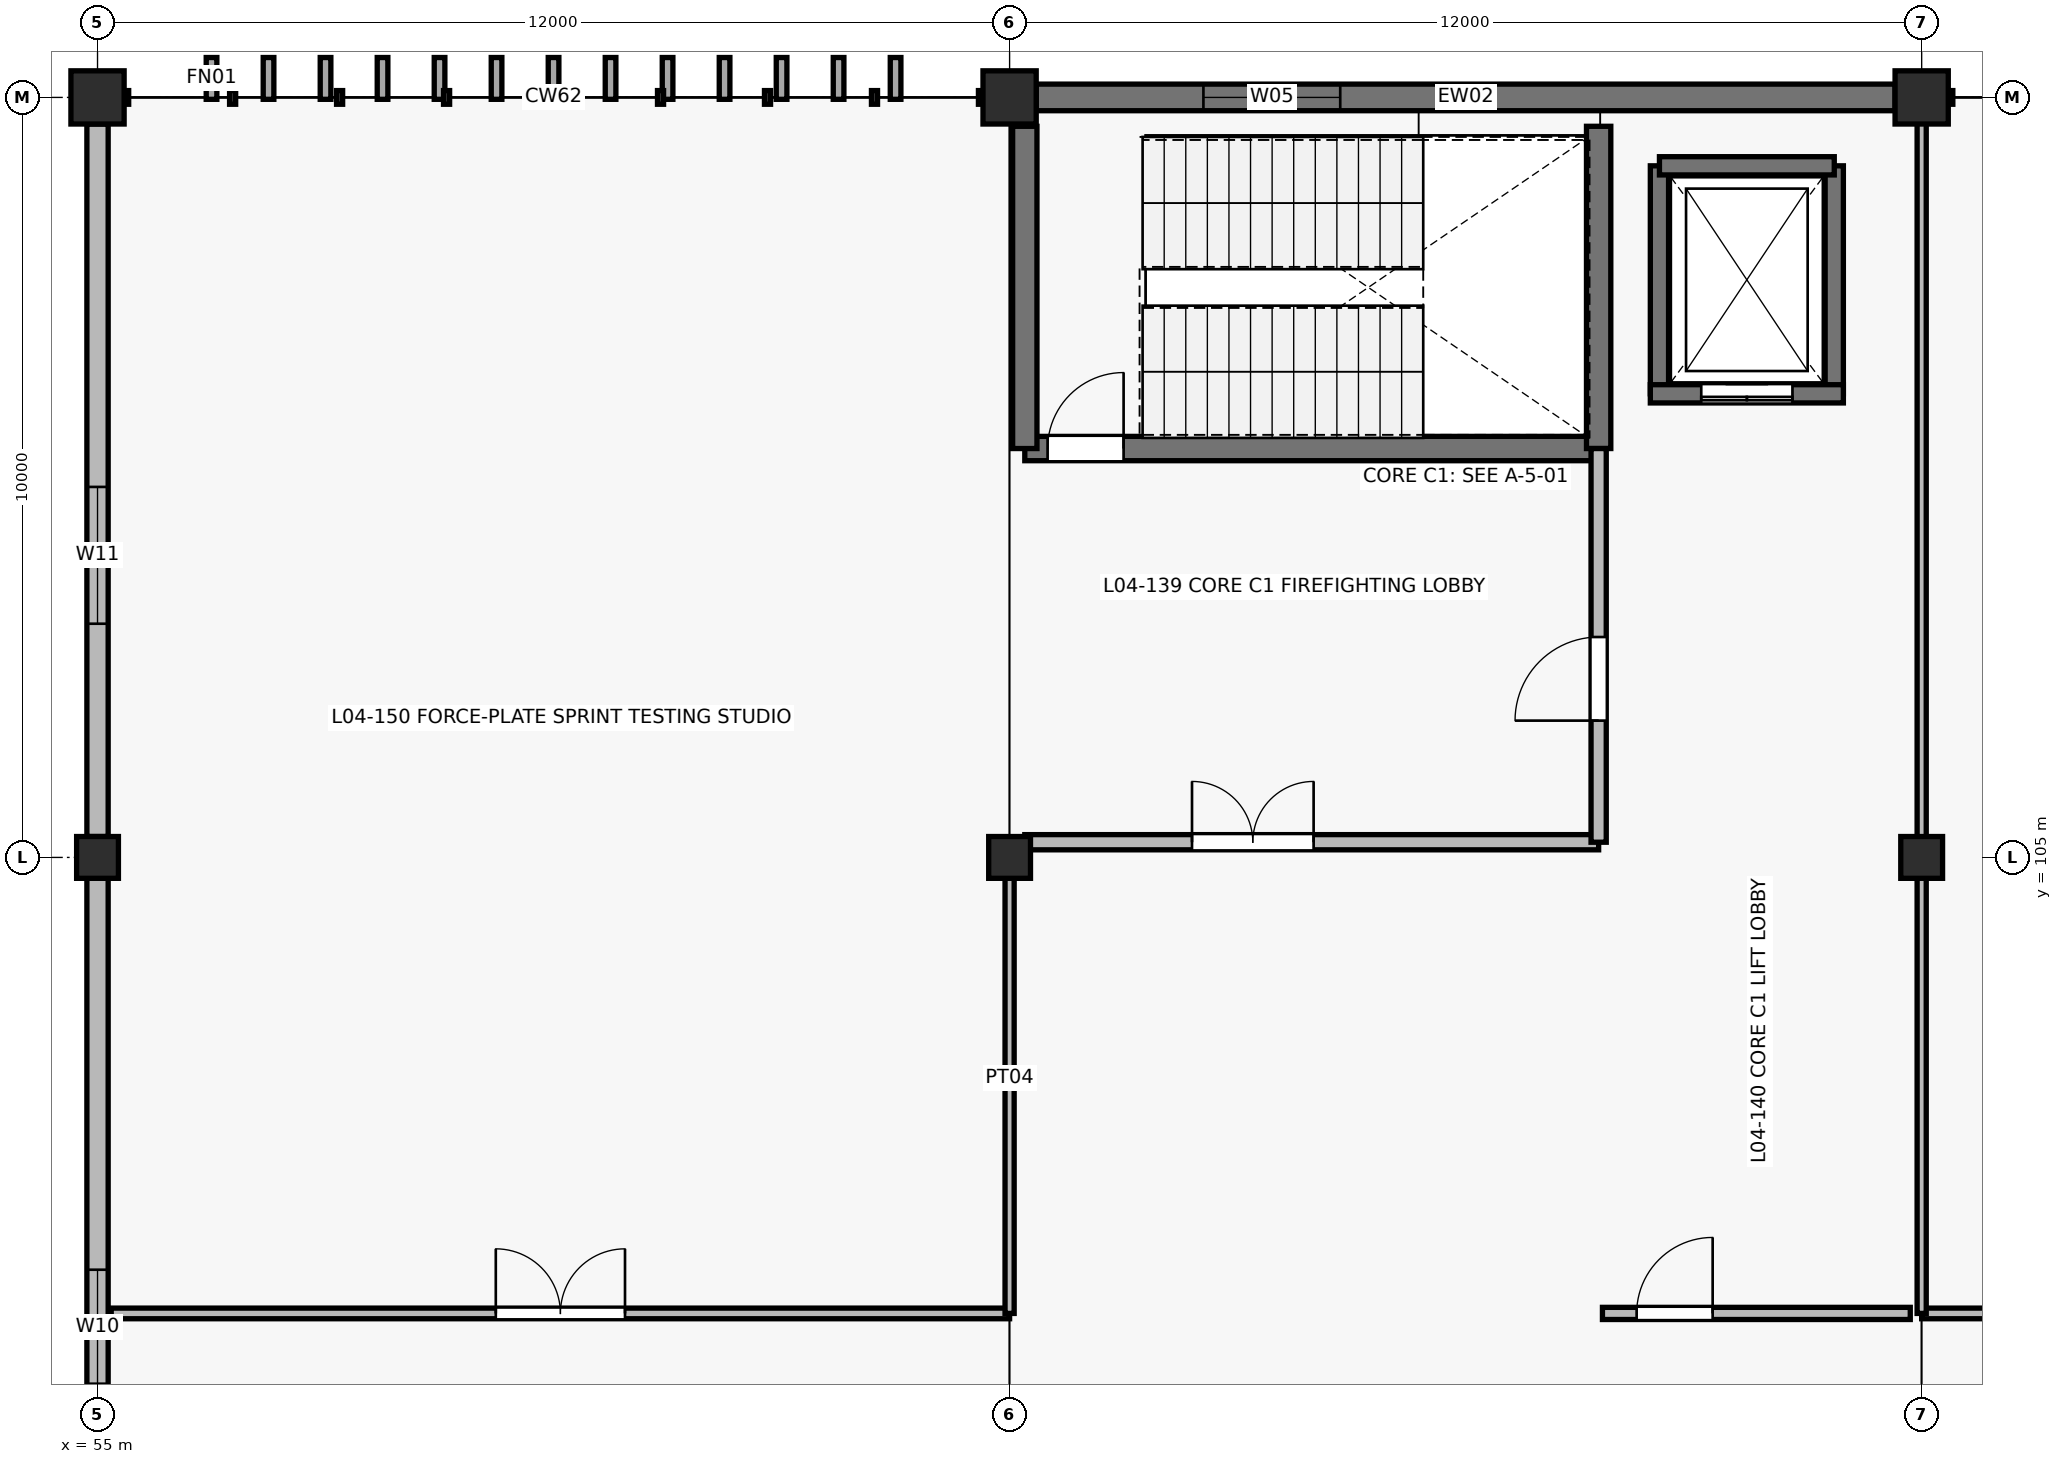
"""IFC4 building model, lengths in metres.
Left out: names, types, materials, properties, quantities, classifications, styles, units other than length and angle.
Written with IfcOpenShell. Run it as: python <this file> out.ifc"""

import sys

from ifc_helpers import new_model, si_unit, direction, frame, frame_2d, origin, origin_2d, place, context, subcontext, project, spatial, rectangle, circle, extrude, element, fill, save


model = new_model("IFC4")
c1 = context("Model", 3, precision=1e-05, world=origin(), true_north=direction((0.0, 1.0)))
c2 = subcontext(c1, "Body", "Model", "MODEL_VIEW")
j1 = project(units=[si_unit("LENGTHUNIT", "METRE"), si_unit("PLANEANGLEUNIT", "RADIAN")], contexts=[c1])
p1 = place(None, origin())
s1 = spatial("IfcSite", under=j1, at=p1, CompositionType="ELEMENT")
p2 = place(p1, origin())
s2 = spatial("IfcBuilding", under=s1, at=p2, CompositionType="ELEMENT")
p3 = place(p2, frame((0.0, 0.0, 17.4)))
s3 = spatial("IfcBuildingStorey", under=s2, at=p3, CompositionType="ELEMENT", Elevation=17.4)
p4 = place(p3, frame((55.0, 105.0, 0.0), z_axis=(0.0, 0.0, 1.0), x_axis=(1.0, 0.0, 0.0)))
e1 = element("IfcColumn", 1, at=p4, inside=s3, PredefinedType="COLUMN", context=c2, shape_type="SweptSolid", body=[
    extrude(rectangle(XDim=0.55, YDim=0.55, at=origin_2d()), origin(), (0.0, 0.0, 1.0), 4.2),
])
p5 = place(p3, frame((55.0, 115.0, 0.0), z_axis=(0.0, 0.0, 1.0), x_axis=(1.0, 0.0, 0.0)))
e2 = element("IfcColumn", 2, at=p5, inside=s3, PredefinedType="COLUMN", context=c2, shape_type="SweptSolid", body=[
    extrude(circle(Radius=0.35, at=origin_2d()), origin(), (0.0, 0.0, 1.0), 4.2),
])
p6 = place(p3, frame((67.0, 105.0, 0.0), z_axis=(0.0, 0.0, 1.0), x_axis=(1.0, 0.0, 0.0)))
e3 = element("IfcColumn", 3, at=p6, inside=s3, PredefinedType="COLUMN", context=c2, shape_type="SweptSolid", body=[
    extrude(rectangle(XDim=0.55, YDim=0.55, at=origin_2d()), origin(), (0.0, 0.0, 1.0), 4.2),
])
p7 = place(p3, frame((67.0, 115.0, 0.0), z_axis=(0.0, 0.0, 1.0), x_axis=(1.0, 0.0, 0.0)))
e4 = element("IfcColumn", 4, at=p7, inside=s3, PredefinedType="COLUMN", context=c2, shape_type="SweptSolid", body=[
    extrude(circle(Radius=0.35, at=origin_2d()), origin(), (0.0, 0.0, 1.0), 4.2),
])
p8 = place(p3, frame((79.0, 105.0, 0.0), z_axis=(0.0, 0.0, 1.0), x_axis=(1.0, 0.0, 0.0)))
e5 = element("IfcColumn", 5, at=p8, inside=s3, PredefinedType="COLUMN", context=c2, shape_type="SweptSolid", body=[
    extrude(rectangle(XDim=0.55, YDim=0.55, at=origin_2d()), origin(), (0.0, 0.0, 1.0), 4.2),
])
p9 = place(p3, frame((79.0, 115.0, 0.0), z_axis=(0.0, 0.0, 1.0), x_axis=(1.0, 0.0, 0.0)))
e6 = element("IfcColumn", 6, at=p9, inside=s3, PredefinedType="COLUMN", context=c2, shape_type="SweptSolid", body=[
    extrude(circle(Radius=0.35, at=origin_2d()), origin(), (0.0, 0.0, 1.0), 4.2),
])
p10 = place(p3, frame((67.35, 115.0, 0.0), z_axis=(0.0, 0.0, 1.0), x_axis=(1.0, 0.0, 0.0)))
e7 = element("IfcWall", 7, at=p10, inside=s3, PredefinedType="SOLIDWALL", context=c2, shape_type="SweptSolid", body=[
    extrude(rectangle(XDim=11.3, YDim=0.35, at=frame_2d((5.65, 0.0))), origin(), (0.0, 0.0, 1.0), 4.2),
])
p11 = place(p10, frame((2.2, 0.0, 1.0)))
e8 = element("IfcOpeningElement", 8, at=p11, cuts=e7, PredefinedType="OPENING", context=c2, shape_type="SweptSolid", body=[
    extrude(rectangle(XDim=1.8, YDim=1.5, at=frame_2d((0.9, 0.75))), frame((0.0, 0.185, 0.0), z_axis=(0.0, -1.0, 0.0), x_axis=(1.0, 0.0, 0.0)), (0.0, 0.0, 1.0), 0.37),
])
p12 = place(p3, frame((55.0, 95.275, 0.0), z_axis=(0.0, 0.0, 1.0), x_axis=(0.0, 1.0, 0.0)))
e9 = element("IfcWall", 9, at=p12, inside=s3, PredefinedType="SOLIDWALL", context=c2, shape_type="SweptSolid", body=[
    extrude(rectangle(XDim=9.45, YDim=0.28, at=frame_2d((4.725, 0.0))), origin(), (0.0, 0.0, 1.0), 2.975),
])
p13 = place(p12, frame((2.8, 0.0, 0.9)))
e10 = element("IfcOpeningElement", 10, at=p13, cuts=e9, PredefinedType="OPENING", context=c2, shape_type="SweptSolid", body=[
    extrude(rectangle(XDim=1.5, YDim=1.8, at=frame_2d((0.75, 0.9))), frame((0.0, 0.15, 0.0), z_axis=(0.0, -1.0, 0.0), x_axis=(1.0, 0.0, 0.0)), (0.0, 0.0, 1.0), 0.3),
])
p14 = place(p3, frame((55.0, 105.275, 0.0), z_axis=(0.0, 0.0, 1.0), x_axis=(0.0, 1.0, 0.0)))
e11 = element("IfcWall", 11, at=p14, inside=s3, PredefinedType="SOLIDWALL", context=c2, shape_type="SweptSolid", body=[
    extrude(rectangle(XDim=9.375, YDim=0.28, at=frame_2d((4.688, 0.0))), origin(), (0.0, 0.0, 1.0), 2.975),
])
p15 = place(p14, frame((2.8, 0.0, 0.9)))
e12 = element("IfcOpeningElement", 12, at=p15, cuts=e11, PredefinedType="OPENING", context=c2, shape_type="SweptSolid", body=[
    extrude(rectangle(XDim=1.8, YDim=1.8, at=frame_2d((0.9, 0.9))), frame((0.0, 0.15, 0.0), z_axis=(0.0, -1.0, 0.0), x_axis=(1.0, 0.0, 0.0)), (0.0, 0.0, 1.0), 0.3),
])
for number, where, z_axis, x_axis in (
    (13, (75.55, 111.1, 0.0), (0.0, 0.0, 1.0), (0.0, 1.0, 0.0)),
    (14, (77.85, 114.1, 0.0), (0.0, 0.0, 1.0), (0.0, -1.0, 0.0)),
):
    element("IfcWall", number, at=place(p3, frame(where, z_axis=z_axis, x_axis=x_axis)), inside=s3, PredefinedType="SHEAR", context=c2, shape_type="SweptSolid", body=[
        extrude(rectangle(XDim=3.0, YDim=0.24, at=frame_2d((1.5, 0.0))), origin(), (0.0, 0.0, 1.0), 4.2),
    ])
p16 = place(p3, frame((75.55, 114.1, 0.0), z_axis=(0.0, 0.0, 1.0), x_axis=(1.0, 0.0, 0.0)))
e15 = element("IfcWall", 15, at=p16, inside=s3, PredefinedType="SHEAR", context=c2, shape_type="SweptSolid", body=[
    extrude(rectangle(XDim=2.3, YDim=0.24, at=frame_2d((1.15, 0.0))), origin(), (0.0, 0.0, 1.0), 4.2),
])
p17 = place(p3, frame((77.97, 111.1, 0.0), z_axis=(0.0, 0.0, 1.0), x_axis=(-1.0, 0.0, 0.0)))
e16 = element("IfcWall", 16, at=p17, inside=s3, PredefinedType="SHEAR", context=c2, shape_type="SweptSolid", body=[
    extrude(rectangle(XDim=2.54, YDim=0.24, at=frame_2d((1.27, 0.0))), origin(), (0.0, 0.0, 1.0), 4.2),
])
p18 = place(p17, frame((0.67, 0.0, 0.0)))
e17 = element("IfcOpeningElement", 17, at=p18, cuts=e16, PredefinedType="OPENING", context=c2, shape_type="SweptSolid", body=[
    extrude(rectangle(XDim=1.2, YDim=2.15, at=frame_2d((0.6, 1.075))), frame((0.0, 0.13, 0.0), z_axis=(0.0, -1.0, 0.0), x_axis=(1.0, 0.0, 0.0)), (0.0, 0.0, 1.0), 0.26),
])
p19 = place(p3, frame((67.2, 110.38, 0.0), z_axis=(0.0, 0.0, 1.0), x_axis=(1.0, 0.0, 0.0)))
e18 = element("IfcWall", 18, at=p19, inside=s3, PredefinedType="SHEAR", context=c2, shape_type="SweptSolid", body=[
    extrude(rectangle(XDim=7.55, YDim=0.32, at=frame_2d((3.775, 0.0))), origin(), (0.0, 0.0, 1.0), 4.2),
])
p20 = place(p19, frame((0.3, 0.0, 0.0)))
e19 = element("IfcOpeningElement", 19, at=p20, cuts=e18, PredefinedType="OPENING", context=c2, shape_type="SweptSolid", body=[
    extrude(rectangle(XDim=1.0, YDim=2.15, at=frame_2d((0.5, 1.075))), frame((0.0, 0.17, 0.0), z_axis=(0.0, -1.0, 0.0), x_axis=(1.0, 0.0, 0.0)), (0.0, 0.0, 1.0), 0.34),
])
for number, where, z_axis, x_axis in (
    (20, (74.75, 110.38, 0.0), (0.0, 0.0, 1.0), (0.0, 1.0, 0.0)),
    (21, (67.2, 114.62, 0.0), (0.0, 0.0, 1.0), (0.0, -1.0, 0.0)),
):
    element("IfcWall", number, at=place(p3, frame(where, z_axis=z_axis, x_axis=x_axis)), inside=s3, PredefinedType="SHEAR", context=c2, shape_type="SweptSolid", body=[
        extrude(rectangle(XDim=4.24, YDim=0.32, at=frame_2d((2.12, 0.0))), origin(), (0.0, 0.0, 1.0), 4.2),
    ])
p21 = place(p3, frame((67.2, 105.2, 0.0), z_axis=(0.0, 0.0, 1.0), x_axis=(1.0, 0.0, 0.0)))
e22 = element("IfcWall", 22, at=p21, inside=s3, PredefinedType="PARTITIONING", context=c2, shape_type="SweptSolid", body=[
    extrude(rectangle(XDim=7.55, YDim=0.2, at=frame_2d((3.775, 0.0))), origin(), (0.0, 0.0, 1.0), 2.975),
])
p22 = place(p21, frame((2.2, 0.0, 0.0)))
e23 = element("IfcOpeningElement", 23, at=p22, cuts=e22, PredefinedType="OPENING", context=c2, shape_type="SweptSolid", body=[
    extrude(rectangle(XDim=1.6, YDim=2.2, at=frame_2d((0.8, 1.1))), frame((0.0, 0.11, 0.0), z_axis=(0.0, -1.0, 0.0), x_axis=(1.0, 0.0, 0.0)), (0.0, 0.0, 1.0), 0.22),
])
p23 = place(p3, frame((74.75, 105.2, 0.0), z_axis=(0.0, 0.0, 1.0), x_axis=(0.0, 1.0, 0.0)))
e24 = element("IfcWall", 24, at=p23, inside=s3, PredefinedType="PARTITIONING", context=c2, shape_type="SweptSolid", body=[
    extrude(rectangle(XDim=5.18, YDim=0.2, at=frame_2d((2.59, 0.0))), origin(), (0.0, 0.0, 1.0), 2.975),
])
p24 = place(p23, frame((1.6, 0.0, 0.0)))
e25 = element("IfcOpeningElement", 25, at=p24, cuts=e24, PredefinedType="OPENING", context=c2, shape_type="SweptSolid", body=[
    extrude(rectangle(XDim=1.1, YDim=2.15, at=frame_2d((0.55, 1.075))), frame((0.0, 0.11, 0.0), z_axis=(0.0, -1.0, 0.0), x_axis=(1.0, 0.0, 0.0)), (0.0, 0.0, 1.0), 0.22),
])
p25 = place(p3, frame((74.8, 99.0, 0.0), z_axis=(0.0, 0.0, 1.0), x_axis=(1.0, 0.0, 0.0)))
e26 = element("IfcWall", 26, at=p25, inside=s3, PredefinedType="PARTITIONING", context=c2, shape_type="SweptSolid", body=[
    extrude(rectangle(XDim=4.05, YDim=0.16, at=frame_2d((2.025, 0.0))), origin(), (0.0, 0.0, 1.0), 2.975),
])
p26 = place(p25, frame((0.45, 0.0, 0.0)))
e27 = element("IfcOpeningElement", 27, at=p26, cuts=e26, PredefinedType="OPENING", context=c2, shape_type="SweptSolid", body=[
    extrude(rectangle(XDim=1.0, YDim=2.15, at=frame_2d((0.5, 1.075))), frame((0.0, 0.09, 0.0), z_axis=(0.0, -1.0, 0.0), x_axis=(1.0, 0.0, 0.0)), (0.0, 0.0, 1.0), 0.18),
])
p27 = place(p3, frame((55.18, 99.0, 0.0), z_axis=(0.0, 0.0, 1.0), x_axis=(1.0, 0.0, 0.0)))
e28 = element("IfcWall", 28, at=p27, inside=s3, PredefinedType="PARTITIONING", context=c2, shape_type="SweptSolid", body=[
    extrude(rectangle(XDim=11.82, YDim=0.14, at=frame_2d((5.91, 0.0))), origin(), (0.0, 0.0, 1.0), 2.975),
])
p28 = place(p27, frame((5.06, 0.0, 0.0)))
e29 = element("IfcOpeningElement", 29, at=p28, cuts=e28, PredefinedType="OPENING", context=c2, shape_type="SweptSolid", body=[
    extrude(rectangle(XDim=1.7, YDim=2.25, at=frame_2d((0.85, 1.125))), frame((0.0, 0.08, 0.0), z_axis=(0.0, -1.0, 0.0), x_axis=(1.0, 0.0, 0.0)), (0.0, 0.0, 1.0), 0.16),
])
p29 = place(p3, frame((67.0, 99.0, 0.0), z_axis=(0.0, 0.0, 1.0), x_axis=(0.0, 1.0, 0.0)))
e30 = element("IfcWall", 30, at=p29, inside=s3, PredefinedType="PARTITIONING", context=c2, shape_type="SweptSolid", body=[
    extrude(rectangle(XDim=6.2, YDim=0.12, at=frame_2d((3.1, 0.0))), origin(), (0.0, 0.0, 1.0), 2.975),
])
p30 = place(p3, frame((79.0, 99.0, 0.0), z_axis=(0.0, 0.0, 1.0), x_axis=(1.0, 0.0, 0.0)))
e31 = element("IfcWall", 31, at=p30, inside=s3, PredefinedType="PARTITIONING", context=c2, shape_type="SweptSolid", body=[
    extrude(rectangle(XDim=12.0, YDim=0.14, at=frame_2d((6.0, 0.0))), origin(), (0.0, 0.0, 1.0), 2.975),
])
p31 = place(p30, frame((5.35, 0.0, 0.0)))
e32 = element("IfcOpeningElement", 32, at=p31, cuts=e31, PredefinedType="OPENING", context=c2, shape_type="SweptSolid", body=[
    extrude(rectangle(XDim=1.3, YDim=2.2, at=frame_2d((0.65, 1.1))), frame((0.0, 0.08, 0.0), z_axis=(0.0, -1.0, 0.0), x_axis=(1.0, 0.0, 0.0)), (0.0, 0.0, 1.0), 0.16),
])
p32 = place(p3, frame((79.0, 99.0, 0.0), z_axis=(0.0, 0.0, 1.0), x_axis=(0.0, 1.0, 0.0)))
e33 = element("IfcWall", 33, at=p32, inside=s3, PredefinedType="PARTITIONING", context=c2, shape_type="SweptSolid", body=[
    extrude(rectangle(XDim=15.75, YDim=0.12, at=frame_2d((7.875, 0.0))), origin(), (0.0, 0.0, 1.0), 2.975),
])
p33 = place(p11, origin())
e34 = element("IfcWindow", 34, at=p33, inside=s3, PartitioningType="DOUBLE_PANEL_VERTICAL", PredefinedType="WINDOW", context=c2, shape_type="SweptSolid", body=[
    extrude(rectangle(XDim=1.8, YDim=1.5, at=frame_2d((0.9, 0.75))), frame((0.0, 0.03, 0.0), z_axis=(0.0, -1.0, 0.0), x_axis=(1.0, 0.0, 0.0)), (0.0, 0.0, 1.0), 0.06),
])
fill(e8, e34)
p34 = place(p13, origin())
e35 = element("IfcWindow", 35, at=p34, inside=s3, PartitioningType="SINGLE_PANEL", PredefinedType="WINDOW", context=c2, shape_type="SweptSolid", body=[
    extrude(rectangle(XDim=1.5, YDim=1.8, at=frame_2d((0.75, 0.9))), frame((0.0, 0.03, 0.0), z_axis=(0.0, -1.0, 0.0), x_axis=(1.0, 0.0, 0.0)), (0.0, 0.0, 1.0), 0.06),
])
fill(e10, e35)
p35 = place(p15, origin())
e36 = element("IfcWindow", 36, at=p35, inside=s3, PartitioningType="DOUBLE_PANEL_VERTICAL", PredefinedType="WINDOW", context=c2, shape_type="SweptSolid", body=[
    extrude(rectangle(XDim=1.8, YDim=1.8, at=frame_2d((0.9, 0.9))), frame((0.0, 0.03, 0.0), z_axis=(0.0, -1.0, 0.0), x_axis=(1.0, 0.0, 0.0)), (0.0, 0.0, 1.0), 0.06),
])
fill(e12, e36)
p36 = place(p18, origin())
e37 = element("IfcDoor", 37, at=p36, inside=s3, OperationType="DOUBLE_DOOR_SLIDING", PredefinedType="USERDEFINED", context=c2, shape_type="SweptSolid", body=[
    extrude(rectangle(XDim=1.2, YDim=2.15, at=frame_2d((0.6, 1.075))), frame((0.0, 0.025, 0.0), z_axis=(0.0, -1.0, 0.0), x_axis=(1.0, 0.0, 0.0)), (0.0, 0.0, 1.0), 0.05),
])
fill(e17, e37)
p37 = place(p20, origin())
e38 = element("IfcDoor", 38, at=p37, inside=s3, OperationType="SINGLE_SWING_RIGHT", PredefinedType="DOOR", context=c2, shape_type="SweptSolid", body=[
    extrude(rectangle(XDim=1.0, YDim=2.15, at=frame_2d((0.5, 1.075))), frame((0.0, 0.025, 0.0), z_axis=(0.0, -1.0, 0.0), x_axis=(1.0, 0.0, 0.0)), (0.0, 0.0, 1.0), 0.05),
])
fill(e19, e38)
p38 = place(p22, origin())
e39 = element("IfcDoor", 39, at=p38, inside=s3, OperationType="DOUBLE_DOOR_SINGLE_SWING", PredefinedType="DOOR", context=c2, shape_type="SweptSolid", body=[
    extrude(rectangle(XDim=1.6, YDim=2.2, at=frame_2d((0.8, 1.1))), frame((0.0, 0.025, 0.0), z_axis=(0.0, -1.0, 0.0), x_axis=(1.0, 0.0, 0.0)), (0.0, 0.0, 1.0), 0.05),
])
fill(e23, e39)
p39 = place(p24, origin())
e40 = element("IfcDoor", 40, at=p39, inside=s3, OperationType="SINGLE_SWING_LEFT", PredefinedType="DOOR", context=c2, shape_type="SweptSolid", body=[
    extrude(rectangle(XDim=1.1, YDim=2.15, at=frame_2d((0.55, 1.075))), frame((0.0, 0.025, 0.0), z_axis=(0.0, -1.0, 0.0), x_axis=(1.0, 0.0, 0.0)), (0.0, 0.0, 1.0), 0.05),
])
fill(e25, e40)
p40 = place(p26, origin())
e41 = element("IfcDoor", 41, at=p40, inside=s3, OperationType="SINGLE_SWING_RIGHT", PredefinedType="DOOR", context=c2, shape_type="SweptSolid", body=[
    extrude(rectangle(XDim=1.0, YDim=2.15, at=frame_2d((0.5, 1.075))), frame((0.0, 0.025, 0.0), z_axis=(0.0, -1.0, 0.0), x_axis=(1.0, 0.0, 0.0)), (0.0, 0.0, 1.0), 0.05),
])
fill(e27, e41)
p41 = place(p28, origin())
e42 = element("IfcDoor", 42, at=p41, inside=s3, OperationType="DOUBLE_DOOR_SINGLE_SWING", PredefinedType="DOOR", context=c2, shape_type="SweptSolid", body=[
    extrude(rectangle(XDim=1.7, YDim=2.25, at=frame_2d((0.85, 1.125))), frame((0.0, 0.025, 0.0), z_axis=(0.0, -1.0, 0.0), x_axis=(1.0, 0.0, 0.0)), (0.0, 0.0, 1.0), 0.05),
])
fill(e29, e42)
save(model, sys.argv[1])
